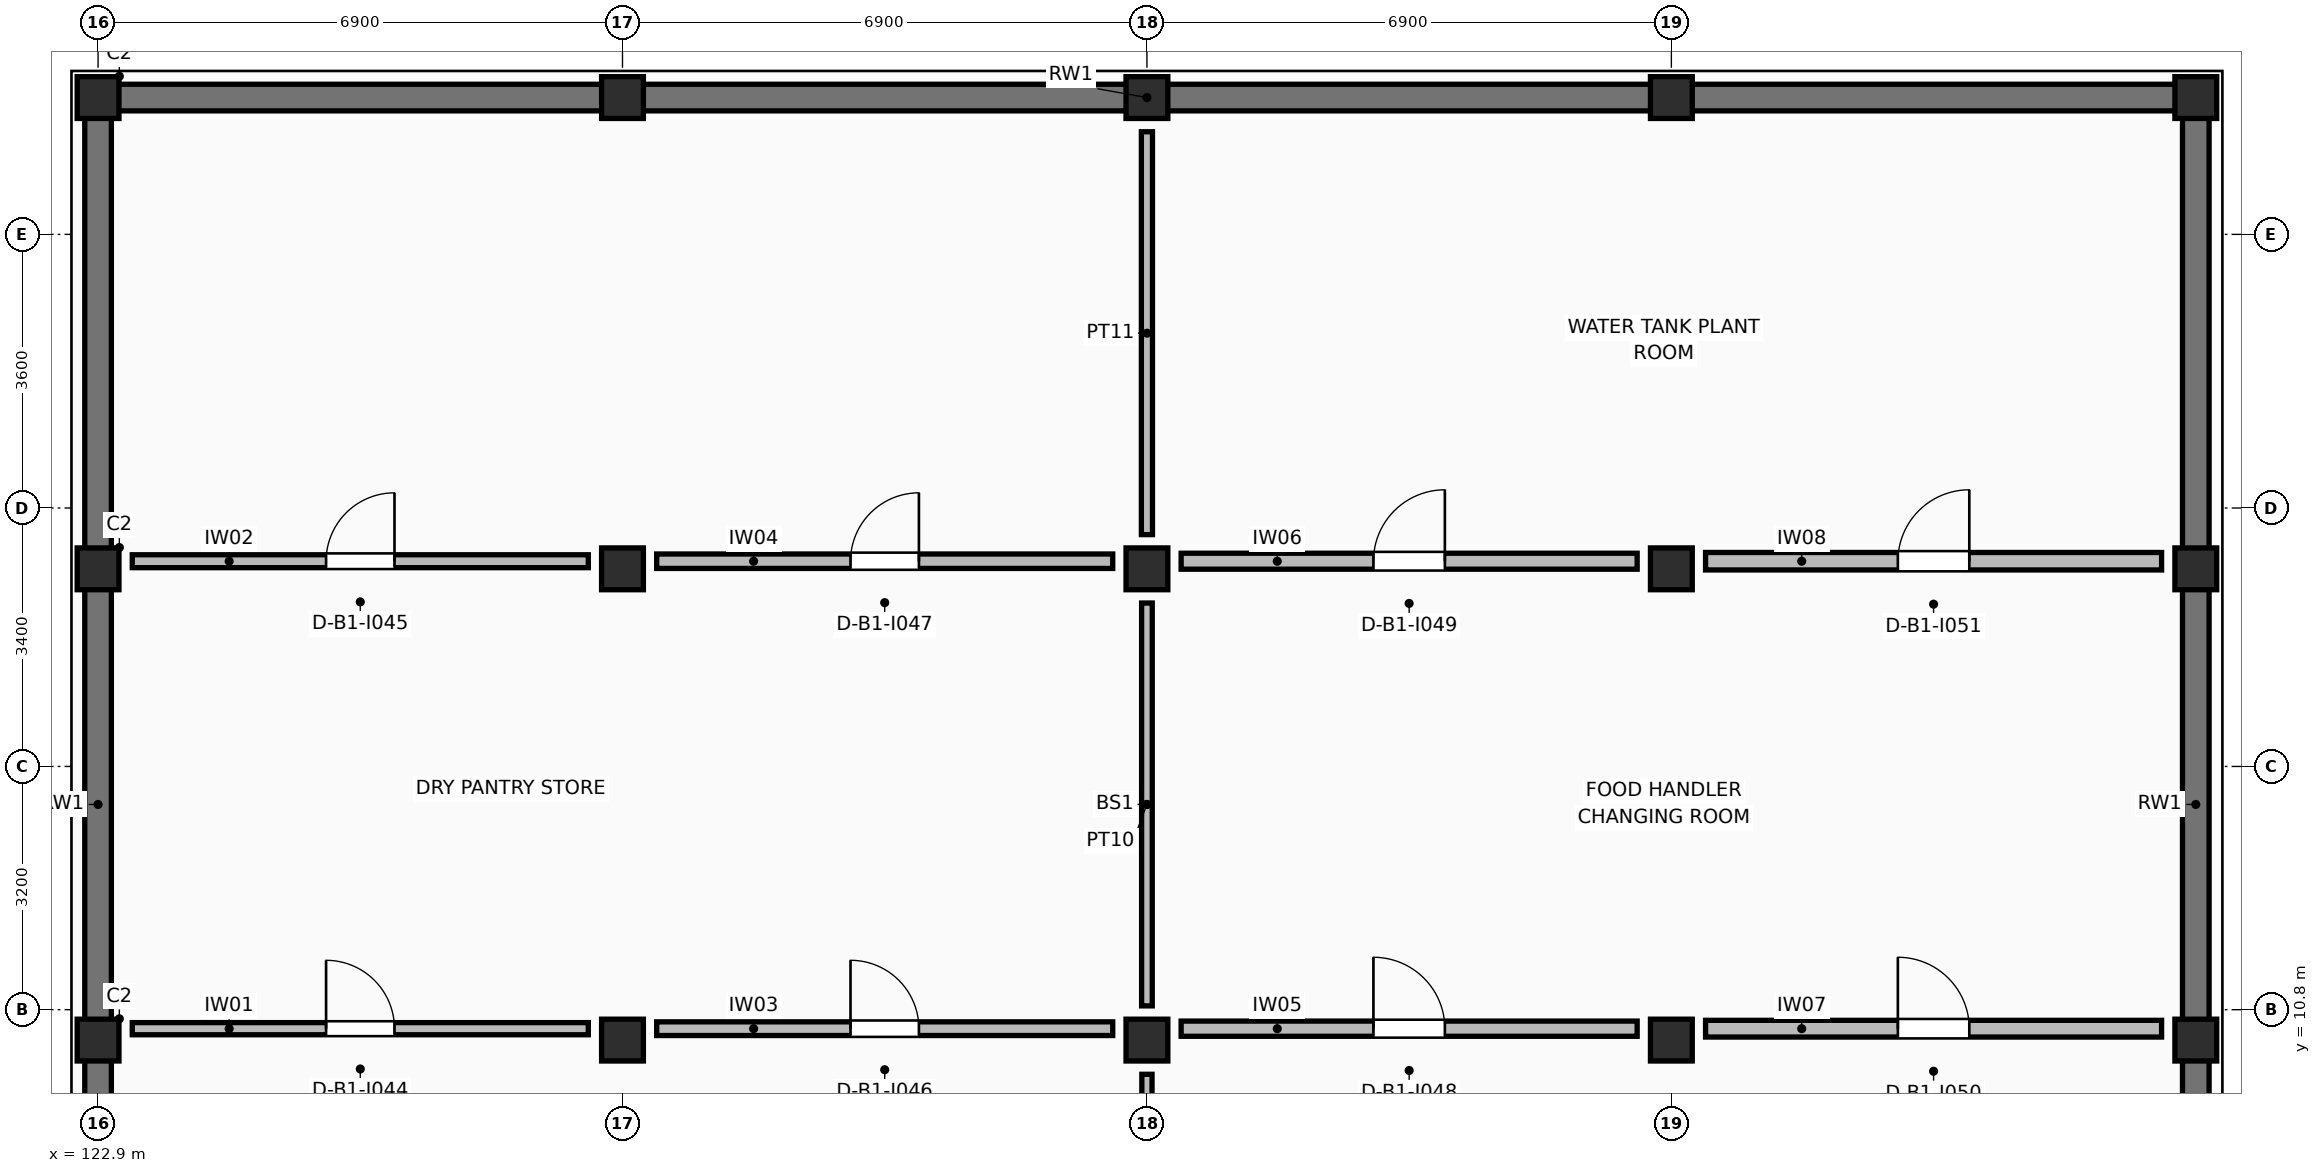
"""IFC4 building model, lengths in metres.
Left out: names, types, materials, properties, quantities, classifications, styles, units other than length and angle.
Written with IfcOpenShell. Run it as: python <this file> out.ifc"""

import sys

from ifc_helpers import new_model, si_unit, direction, frame, frame_2d, origin, origin_2d, place, context, subcontext, project, spatial, rectangle, extrude, element, fill, save


model = new_model("IFC4")
c1 = context("Model", 3, precision=1e-05, world=origin(), true_north=direction((0.0, 1.0)))
c2 = subcontext(c1, "Body", "Model", "MODEL_VIEW")
j1 = project(units=[si_unit("LENGTHUNIT", "METRE"), si_unit("PLANEANGLEUNIT", "RADIAN")], contexts=[c1])
p1 = place(None, origin())
s1 = spatial("IfcSite", under=j1, at=p1, CompositionType="ELEMENT")
p2 = place(p1, origin())
s2 = spatial("IfcBuilding", under=s1, at=p2, CompositionType="ELEMENT")
p3 = place(p2, frame((0.0, 0.0, -4.08)))
s3 = spatial("IfcBuildingStorey", under=s2, at=p3, CompositionType="ELEMENT", Elevation=-4.08)
for number, where, z_axis, x_axis in (
    (1, (122.9, 10.4, 0.0), (0.0, 0.0, 1.0), (1.0, 0.0, 0.0)),
    (2, (122.9, 16.6, 0.0), (0.0, 0.0, 1.0), (1.0, 0.0, 0.0)),
    (3, (122.9, 22.8, 0.0), (0.0, 0.0, 1.0), (1.0, 0.0, 0.0)),
    (4, (129.8, 10.4, 0.0), (0.0, 0.0, 1.0), (1.0, 0.0, 0.0)),
    (5, (129.8, 16.6, 0.0), (0.0, 0.0, 1.0), (1.0, 0.0, 0.0)),
    (6, (129.8, 22.8, 0.0), (0.0, 0.0, 1.0), (1.0, 0.0, 0.0)),
    (7, (136.7, 10.4, 0.0), (0.0, 0.0, 1.0), (1.0, 0.0, 0.0)),
    (8, (136.7, 16.6, 0.0), (0.0, 0.0, 1.0), (1.0, 0.0, 0.0)),
    (9, (136.7, 22.8, 0.0), (0.0, 0.0, 1.0), (1.0, 0.0, 0.0)),
    (10, (143.6, 10.4, 0.0), (0.0, 0.0, 1.0), (1.0, 0.0, 0.0)),
    (11, (143.6, 16.6, 0.0), (0.0, 0.0, 1.0), (1.0, 0.0, 0.0)),
    (12, (143.6, 22.8, 0.0), (0.0, 0.0, 1.0), (1.0, 0.0, 0.0)),
    (13, (150.5, 10.4, 0.0), (0.0, 0.0, 1.0), (1.0, 0.0, 0.0)),
    (14, (150.5, 16.6, 0.0), (0.0, 0.0, 1.0), (1.0, 0.0, 0.0)),
    (15, (150.5, 22.8, 0.0), (0.0, 0.0, 1.0), (1.0, 0.0, 0.0)),
):
    element("IfcColumn", number, at=place(p3, frame(where, z_axis=z_axis, x_axis=x_axis)), inside=s3, PredefinedType="COLUMN", context=c2, shape_type="SweptSolid", body=[
        extrude(rectangle(XDim=0.55, YDim=0.55, at=origin_2d()), origin(), (0.0, 0.0, 1.0), 4.08),
    ])
p4 = place(p3, frame((122.725, 22.8, 0.0), z_axis=(0.0, 0.0, 1.0), x_axis=(1.0, 0.0, 0.0)))
e16 = element("IfcWall", 16, at=p4, inside=s3, PredefinedType="USERDEFINED", context=c2, shape_type="SweptSolid", body=[
    extrude(rectangle(XDim=27.95, YDim=0.35, at=frame_2d((13.975, 0.0))), origin(), (0.0, 0.0, 1.0), 3.065),
])
for number, where, z_axis, x_axis in (
    (17, (122.9, 4.375, 0.0), (0.0, 0.0, 1.0), (0.0, 1.0, 0.0)),
    (18, (150.5, 4.375, 0.0), (0.0, 0.0, 1.0), (0.0, 1.0, 0.0)),
):
    element("IfcWall", number, at=place(p3, frame(where, z_axis=z_axis, x_axis=x_axis)), inside=s3, PredefinedType="USERDEFINED", context=c2, shape_type="SweptSolid", body=[
        extrude(rectangle(XDim=18.25, YDim=0.35, at=frame_2d((9.125, 0.0))), origin(), (0.0, 0.0, 1.0), 3.065),
    ])
p5 = place(p3, frame((123.35, 10.55, 0.0), z_axis=(0.0, 0.0, 1.0), x_axis=(1.0, 0.0, 0.0)))
e19 = element("IfcWall", 19, at=p5, inside=s3, PredefinedType="STANDARD", context=c2, shape_type="SweptSolid", body=[
    extrude(rectangle(XDim=6.0, YDim=0.16, at=frame_2d((3.0, 0.0))), origin(), (0.0, 0.0, 1.0), 2.72),
])
p6 = place(p5, frame((2.55, 0.0, 0.0)))
e20 = element("IfcOpeningElement", 20, at=p6, cuts=e19, PredefinedType="OPENING", context=c2, shape_type="SweptSolid", body=[
    extrude(rectangle(XDim=0.9, YDim=2.06, at=frame_2d((0.45, 1.03))), frame((0.0, 0.09, 0.0), z_axis=(0.0, -1.0, 0.0), x_axis=(1.0, 0.0, 0.0)), (0.0, 0.0, 1.0), 0.18),
])
p7 = place(p3, frame((123.35, 16.7, 0.0), z_axis=(0.0, 0.0, 1.0), x_axis=(1.0, 0.0, 0.0)))
e21 = element("IfcWall", 21, at=p7, inside=s3, PredefinedType="STANDARD", context=c2, shape_type="SweptSolid", body=[
    extrude(rectangle(XDim=6.0, YDim=0.17, at=frame_2d((3.0, 0.0))), origin(), (0.0, 0.0, 1.0), 2.72),
])
p8 = place(p7, frame((2.55, 0.0, 0.0)))
e22 = element("IfcOpeningElement", 22, at=p8, cuts=e21, PredefinedType="OPENING", context=c2, shape_type="SweptSolid", body=[
    extrude(rectangle(XDim=0.9, YDim=2.12, at=frame_2d((0.45, 1.06))), frame((0.0, 0.095, 0.0), z_axis=(0.0, -1.0, 0.0), x_axis=(1.0, 0.0, 0.0)), (0.0, 0.0, 1.0), 0.19),
])
p9 = place(p3, frame((130.25, 10.55, 0.0), z_axis=(0.0, 0.0, 1.0), x_axis=(1.0, 0.0, 0.0)))
e23 = element("IfcWall", 23, at=p9, inside=s3, PredefinedType="STANDARD", context=c2, shape_type="SweptSolid", body=[
    extrude(rectangle(XDim=6.0, YDim=0.18, at=frame_2d((3.0, 0.0))), origin(), (0.0, 0.0, 1.0), 2.72),
])
p10 = place(p9, frame((2.55, 0.0, 0.0)))
e24 = element("IfcOpeningElement", 24, at=p10, cuts=e23, PredefinedType="OPENING", context=c2, shape_type="SweptSolid", body=[
    extrude(rectangle(XDim=0.9, YDim=2.18, at=frame_2d((0.45, 1.09))), frame((0.0, 0.1, 0.0), z_axis=(0.0, -1.0, 0.0), x_axis=(1.0, 0.0, 0.0)), (0.0, 0.0, 1.0), 0.2),
])
p11 = place(p3, frame((130.25, 16.7, 0.0), z_axis=(0.0, 0.0, 1.0), x_axis=(1.0, 0.0, 0.0)))
e25 = element("IfcWall", 25, at=p11, inside=s3, PredefinedType="STANDARD", context=c2, shape_type="SweptSolid", body=[
    extrude(rectangle(XDim=6.0, YDim=0.19, at=frame_2d((3.0, 0.0))), origin(), (0.0, 0.0, 1.0), 2.72),
])
p12 = place(p11, frame((2.55, 0.0, 0.0)))
e26 = element("IfcOpeningElement", 26, at=p12, cuts=e25, PredefinedType="OPENING", context=c2, shape_type="SweptSolid", body=[
    extrude(rectangle(XDim=0.9, YDim=2.24, at=frame_2d((0.45, 1.12))), frame((0.0, 0.105, 0.0), z_axis=(0.0, -1.0, 0.0), x_axis=(1.0, 0.0, 0.0)), (0.0, 0.0, 1.0), 0.21),
])
p13 = place(p3, frame((137.15, 10.55, 0.0), z_axis=(0.0, 0.0, 1.0), x_axis=(1.0, 0.0, 0.0)))
e27 = element("IfcWall", 27, at=p13, inside=s3, PredefinedType="STANDARD", context=c2, shape_type="SweptSolid", body=[
    extrude(rectangle(XDim=6.0, YDim=0.2, at=frame_2d((3.0, 0.0))), origin(), (0.0, 0.0, 1.0), 2.72),
])
p14 = place(p13, frame((2.53, 0.0, 0.0)))
e28 = element("IfcOpeningElement", 28, at=p14, cuts=e27, PredefinedType="OPENING", context=c2, shape_type="SweptSolid", body=[
    extrude(rectangle(XDim=0.94, YDim=2.06, at=frame_2d((0.47, 1.03))), frame((0.0, 0.11, 0.0), z_axis=(0.0, -1.0, 0.0), x_axis=(1.0, 0.0, 0.0)), (0.0, 0.0, 1.0), 0.22),
])
p15 = place(p3, frame((137.15, 16.7, 0.0), z_axis=(0.0, 0.0, 1.0), x_axis=(1.0, 0.0, 0.0)))
e29 = element("IfcWall", 29, at=p15, inside=s3, PredefinedType="STANDARD", context=c2, shape_type="SweptSolid", body=[
    extrude(rectangle(XDim=6.0, YDim=0.21, at=frame_2d((3.0, 0.0))), origin(), (0.0, 0.0, 1.0), 2.72),
])
p16 = place(p15, frame((2.53, 0.0, 0.0)))
e30 = element("IfcOpeningElement", 30, at=p16, cuts=e29, PredefinedType="OPENING", context=c2, shape_type="SweptSolid", body=[
    extrude(rectangle(XDim=0.94, YDim=2.12, at=frame_2d((0.47, 1.06))), frame((0.0, 0.115, 0.0), z_axis=(0.0, -1.0, 0.0), x_axis=(1.0, 0.0, 0.0)), (0.0, 0.0, 1.0), 0.23),
])
p17 = place(p3, frame((144.05, 10.55, 0.0), z_axis=(0.0, 0.0, 1.0), x_axis=(1.0, 0.0, 0.0)))
e31 = element("IfcWall", 31, at=p17, inside=s3, PredefinedType="STANDARD", context=c2, shape_type="SweptSolid", body=[
    extrude(rectangle(XDim=6.0, YDim=0.22, at=frame_2d((3.0, 0.0))), origin(), (0.0, 0.0, 1.0), 2.72),
])
p18 = place(p17, frame((2.53, 0.0, 0.0)))
e32 = element("IfcOpeningElement", 32, at=p18, cuts=e31, PredefinedType="OPENING", context=c2, shape_type="SweptSolid", body=[
    extrude(rectangle(XDim=0.94, YDim=2.18, at=frame_2d((0.47, 1.09))), frame((0.0, 0.12, 0.0), z_axis=(0.0, -1.0, 0.0), x_axis=(1.0, 0.0, 0.0)), (0.0, 0.0, 1.0), 0.24),
])
p19 = place(p3, frame((144.05, 16.7, 0.0), z_axis=(0.0, 0.0, 1.0), x_axis=(1.0, 0.0, 0.0)))
e33 = element("IfcWall", 33, at=p19, inside=s3, PredefinedType="STANDARD", context=c2, shape_type="SweptSolid", body=[
    extrude(rectangle(XDim=6.0, YDim=0.23, at=frame_2d((3.0, 0.0))), origin(), (0.0, 0.0, 1.0), 2.72),
])
p20 = place(p19, frame((2.53, 0.0, 0.0)))
e34 = element("IfcOpeningElement", 34, at=p20, cuts=e33, PredefinedType="OPENING", context=c2, shape_type="SweptSolid", body=[
    extrude(rectangle(XDim=0.94, YDim=2.24, at=frame_2d((0.47, 1.12))), frame((0.0, 0.125, 0.0), z_axis=(0.0, -1.0, 0.0), x_axis=(1.0, 0.0, 0.0)), (0.0, 0.0, 1.0), 0.25),
])
p21 = place(p3, frame((136.7, 4.65, 0.0), z_axis=(0.0, 0.0, 1.0), x_axis=(0.0, 1.0, 0.0)))
e35 = element("IfcWall", 35, at=p21, inside=s3, PredefinedType="PARTITIONING", context=c2, shape_type="SweptSolid", body=[
    extrude(rectangle(XDim=5.3, YDim=0.134, at=frame_2d((2.65, 0.0))), origin(), (0.0, 0.0, 1.0), 2.72),
])
p22 = place(p3, frame((136.7, 10.85, 0.0), z_axis=(0.0, 0.0, 1.0), x_axis=(0.0, 1.0, 0.0)))
e36 = element("IfcWall", 36, at=p22, inside=s3, PredefinedType="PARTITIONING", context=c2, shape_type="SweptSolid", body=[
    extrude(rectangle(XDim=5.3, YDim=0.14, at=frame_2d((2.65, 0.0))), origin(), (0.0, 0.0, 1.0), 2.72),
])
p23 = place(p3, frame((136.7, 17.05, 0.0), z_axis=(0.0, 0.0, 1.0), x_axis=(0.0, 1.0, 0.0)))
e37 = element("IfcWall", 37, at=p23, inside=s3, PredefinedType="PARTITIONING", context=c2, shape_type="SweptSolid", body=[
    extrude(rectangle(XDim=5.3, YDim=0.146, at=frame_2d((2.65, 0.0))), origin(), (0.0, 0.0, 1.0), 2.72),
])
p24 = place(p6, origin())
e38 = element("IfcDoor", 38, at=p24, inside=s3, OperationType="SINGLE_SWING_LEFT", PredefinedType="DOOR", context=c2, shape_type="SweptSolid", body=[
    extrude(rectangle(XDim=0.9, YDim=2.06, at=frame_2d((0.45, 1.03))), frame((0.0, 0.025, 0.0), z_axis=(0.0, -1.0, 0.0), x_axis=(1.0, 0.0, 0.0)), (0.0, 0.0, 1.0), 0.05),
])
fill(e20, e38)
p25 = place(p8, frame((0.9, 0.0, 0.0), z_axis=(0.0, 0.0, 1.0), x_axis=(-1.0, 0.0, 0.0)))
e39 = element("IfcDoor", 39, at=p25, inside=s3, OperationType="SINGLE_SWING_RIGHT", PredefinedType="DOOR", context=c2, shape_type="SweptSolid", body=[
    extrude(rectangle(XDim=0.9, YDim=2.12, at=frame_2d((0.45, 1.06))), frame((0.0, 0.025, 0.0), z_axis=(0.0, -1.0, 0.0), x_axis=(1.0, 0.0, 0.0)), (0.0, 0.0, 1.0), 0.05),
])
fill(e22, e39)
p26 = place(p10, origin())
e40 = element("IfcDoor", 40, at=p26, inside=s3, OperationType="SINGLE_SWING_LEFT", PredefinedType="DOOR", context=c2, shape_type="SweptSolid", body=[
    extrude(rectangle(XDim=0.9, YDim=2.18, at=frame_2d((0.45, 1.09))), frame((0.0, 0.025, 0.0), z_axis=(0.0, -1.0, 0.0), x_axis=(1.0, 0.0, 0.0)), (0.0, 0.0, 1.0), 0.05),
])
fill(e24, e40)
p27 = place(p12, frame((0.9, 0.0, 0.0), z_axis=(0.0, 0.0, 1.0), x_axis=(-1.0, 0.0, 0.0)))
e41 = element("IfcDoor", 41, at=p27, inside=s3, OperationType="SINGLE_SWING_RIGHT", PredefinedType="DOOR", context=c2, shape_type="SweptSolid", body=[
    extrude(rectangle(XDim=0.9, YDim=2.24, at=frame_2d((0.45, 1.12))), frame((0.0, 0.025, 0.0), z_axis=(0.0, -1.0, 0.0), x_axis=(1.0, 0.0, 0.0)), (0.0, 0.0, 1.0), 0.05),
])
fill(e26, e41)
p28 = place(p14, origin())
e42 = element("IfcDoor", 42, at=p28, inside=s3, OperationType="SINGLE_SWING_LEFT", PredefinedType="DOOR", context=c2, shape_type="SweptSolid", body=[
    extrude(rectangle(XDim=0.94, YDim=2.06, at=frame_2d((0.47, 1.03))), frame((0.0, 0.025, 0.0), z_axis=(0.0, -1.0, 0.0), x_axis=(1.0, 0.0, 0.0)), (0.0, 0.0, 1.0), 0.05),
])
fill(e28, e42)
p29 = place(p16, frame((0.94, 0.0, 0.0), z_axis=(0.0, 0.0, 1.0), x_axis=(-1.0, 0.0, 0.0)))
e43 = element("IfcDoor", 43, at=p29, inside=s3, OperationType="SINGLE_SWING_RIGHT", PredefinedType="DOOR", context=c2, shape_type="SweptSolid", body=[
    extrude(rectangle(XDim=0.94, YDim=2.12, at=frame_2d((0.47, 1.06))), frame((0.0, 0.025, 0.0), z_axis=(0.0, -1.0, 0.0), x_axis=(1.0, 0.0, 0.0)), (0.0, 0.0, 1.0), 0.05),
])
fill(e30, e43)
p30 = place(p18, origin())
e44 = element("IfcDoor", 44, at=p30, inside=s3, OperationType="SINGLE_SWING_LEFT", PredefinedType="DOOR", context=c2, shape_type="SweptSolid", body=[
    extrude(rectangle(XDim=0.94, YDim=2.18, at=frame_2d((0.47, 1.09))), frame((0.0, 0.025, 0.0), z_axis=(0.0, -1.0, 0.0), x_axis=(1.0, 0.0, 0.0)), (0.0, 0.0, 1.0), 0.05),
])
fill(e32, e44)
p31 = place(p20, frame((0.94, 0.0, 0.0), z_axis=(0.0, 0.0, 1.0), x_axis=(-1.0, 0.0, 0.0)))
e45 = element("IfcDoor", 45, at=p31, inside=s3, OperationType="SINGLE_SWING_RIGHT", PredefinedType="DOOR", context=c2, shape_type="SweptSolid", body=[
    extrude(rectangle(XDim=0.94, YDim=2.24, at=frame_2d((0.47, 1.12))), frame((0.0, 0.025, 0.0), z_axis=(0.0, -1.0, 0.0), x_axis=(1.0, 0.0, 0.0)), (0.0, 0.0, 1.0), 0.05),
])
fill(e34, e45)
save(model, sys.argv[1])
